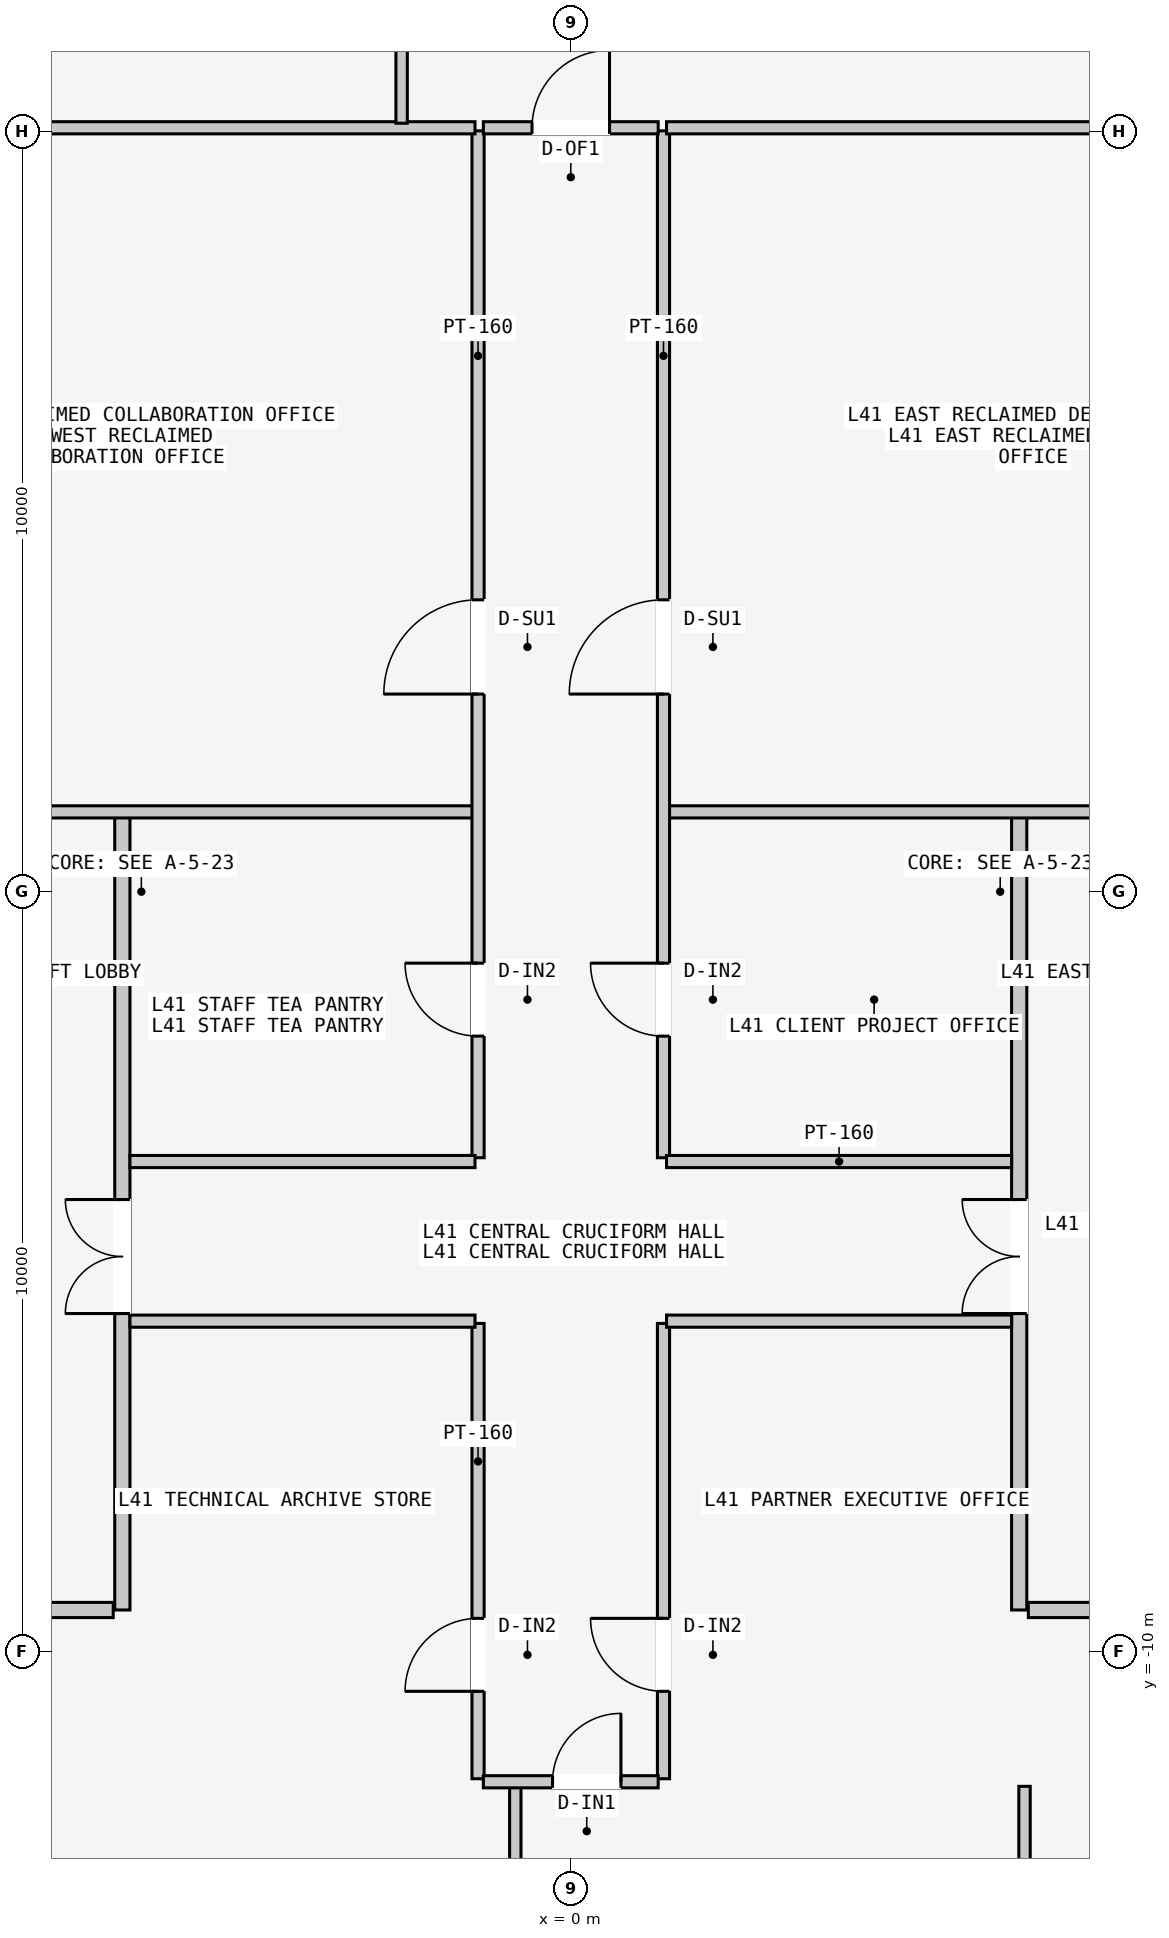
"""IFC4 building model, lengths in metres.
Left out: names, types, materials, properties, quantities, classifications, styles, units other than length and angle.
Written with IfcOpenShell. Run it as: python <this file> out.ifc"""

import sys

from ifc_helpers import new_model, si_unit, direction, frame, frame_2d, origin, place, context, subcontext, project, spatial, rectangle, extrude, element, fill, save


model = new_model("IFC4")
c1 = context("Model", 3, precision=1e-05, world=origin(), true_north=direction((0.0, 1.0)))
c2 = subcontext(c1, "Body", "Model", "MODEL_VIEW")
j1 = project(units=[si_unit("LENGTHUNIT", "METRE"), si_unit("PLANEANGLEUNIT", "RADIAN")], contexts=[c1])
p1 = place(None, origin())
s1 = spatial("IfcSite", under=j1, at=p1, CompositionType="ELEMENT")
p2 = place(p1, origin())
s2 = spatial("IfcBuilding", under=s1, at=p2, CompositionType="ELEMENT")
p3 = place(p2, frame((0.0, 0.0, 158.7)))
s3 = spatial("IfcBuildingStorey", under=s2, at=p3, CompositionType="ELEMENT", Elevation=158.7)
p4 = place(p3, frame((-5.9, -9.45, 0.0), z_axis=(0.0, 0.0, 1.0), x_axis=(0.0, 1.0, 0.0)))
e1 = element("IfcWall", 1, at=p4, inside=s3, PredefinedType="PARTITIONING", context=c2, shape_type="SweptSolid", body=[
    extrude(rectangle(XDim=10.5, YDim=0.2, at=frame_2d((5.25, 0.0))), origin(), (0.0, 0.0, 1.0), 3.4),
])
p5 = place(p4, frame((3.9, 0.0, 0.0)))
e2 = element("IfcOpeningElement", 2, at=p5, cuts=e1, PredefinedType="OPENING", context=c2, shape_type="SweptSolid", body=[
    extrude(rectangle(XDim=1.5, YDim=2.2, at=frame_2d((0.75, 1.1))), frame((0.0, 0.11, 0.0), z_axis=(0.0, -1.0, 0.0), x_axis=(1.0, 0.0, 0.0)), (0.0, 0.0, 1.0), 0.22),
])
p6 = place(p3, frame((-6.02, -9.45, 0.0), z_axis=(0.0, 0.0, 1.0), x_axis=(-1.0, 0.0, 0.0)))
e3 = element("IfcWall", 3, at=p6, inside=s3, PredefinedType="PARTITIONING", context=c2, shape_type="SweptSolid", body=[
    extrude(rectangle(XDim=1.8, YDim=0.2, at=frame_2d((0.9, 0.0))), origin(), (0.0, 0.0, 1.0), 3.4),
])
p7 = place(p3, frame((5.9, -9.45, 0.0), z_axis=(0.0, 0.0, 1.0), x_axis=(0.0, 1.0, 0.0)))
e4 = element("IfcWall", 4, at=p7, inside=s3, PredefinedType="PARTITIONING", context=c2, shape_type="SweptSolid", body=[
    extrude(rectangle(XDim=10.5, YDim=0.2, at=frame_2d((5.25, 0.0))), origin(), (0.0, 0.0, 1.0), 3.4),
])
p8 = place(p7, frame((3.9, 0.0, 0.0)))
e5 = element("IfcOpeningElement", 5, at=p8, cuts=e4, PredefinedType="OPENING", context=c2, shape_type="SweptSolid", body=[
    extrude(rectangle(XDim=1.5, YDim=2.2, at=frame_2d((0.75, 1.1))), frame((0.0, 0.11, 0.0), z_axis=(0.0, -1.0, 0.0), x_axis=(1.0, 0.0, 0.0)), (0.0, 0.0, 1.0), 0.22),
])
p9 = place(p3, frame((6.02, -9.45, 0.0), z_axis=(0.0, 0.0, 1.0), x_axis=(1.0, 0.0, 0.0)))
e6 = element("IfcWall", 6, at=p9, inside=s3, PredefinedType="PARTITIONING", context=c2, shape_type="SweptSolid", body=[
    extrude(rectangle(XDim=1.8, YDim=0.2, at=frame_2d((0.9, 0.0))), origin(), (0.0, 0.0, 1.0), 3.4),
])
p10 = place(p3, frame((-10.05, 1.05, 0.0), z_axis=(0.0, 0.0, 1.0), x_axis=(1.0, 0.0, 0.0)))
e7 = element("IfcWall", 7, at=p10, inside=s3, PredefinedType="PARTITIONING", context=c2, shape_type="SweptSolid", body=[
    extrude(rectangle(XDim=8.79, YDim=0.16, at=frame_2d((4.395, 0.0))), origin(), (0.0, 0.0, 1.0), 3.4),
])
p11 = place(p3, frame((-1.22, -3.5, 0.0), z_axis=(0.0, 0.0, 1.0), x_axis=(0.0, 1.0, 0.0)))
e8 = element("IfcWall", 8, at=p11, inside=s3, PredefinedType="PARTITIONING", context=c2, shape_type="SweptSolid", body=[
    extrude(rectangle(XDim=13.51, YDim=0.16, at=frame_2d((6.755, 0.0))), origin(), (0.0, 0.0, 1.0), 3.4),
])
p12 = place(p11, frame((6.1, 0.0, 0.0)))
e9 = element("IfcOpeningElement", 9, at=p12, cuts=e8, PredefinedType="OPENING", context=c2, shape_type="SweptSolid", body=[
    extrude(rectangle(XDim=1.24, YDim=2.24, at=frame_2d((0.62, 1.12))), frame((0.0, 0.09, 0.0), z_axis=(0.0, -1.0, 0.0), x_axis=(1.0, 0.0, 0.0)), (0.0, 0.0, 1.0), 0.18),
])
p13 = place(p11, frame((1.6, 0.0, 0.0)))
e10 = element("IfcOpeningElement", 10, at=p13, cuts=e8, PredefinedType="OPENING", context=c2, shape_type="SweptSolid", body=[
    extrude(rectangle(XDim=0.96, YDim=2.18, at=frame_2d((0.48, 1.09))), frame((0.0, 0.09, 0.0), z_axis=(0.0, -1.0, 0.0), x_axis=(1.0, 0.0, 0.0)), (0.0, 0.0, 1.0), 0.18),
])
p14 = place(p3, frame((-7.5, 10.05, 0.0), z_axis=(0.0, 0.0, 1.0), x_axis=(1.0, 0.0, 0.0)))
e11 = element("IfcWall", 11, at=p14, inside=s3, PredefinedType="PARTITIONING", context=c2, shape_type="SweptSolid", body=[
    extrude(rectangle(XDim=6.24, YDim=0.16, at=frame_2d((3.12, 0.0))), origin(), (0.0, 0.0, 1.0), 3.4),
])
p15 = place(p3, frame((-5.8, -3.55, 0.0), z_axis=(0.0, 0.0, 1.0), x_axis=(1.0, 0.0, 0.0)))
e12 = element("IfcWall", 12, at=p15, inside=s3, PredefinedType="PARTITIONING", context=c2, shape_type="SweptSolid", body=[
    extrude(rectangle(XDim=4.54, YDim=0.16, at=frame_2d((2.27, 0.0))), origin(), (0.0, 0.0, 1.0), 3.4),
])
p16 = place(p3, frame((1.26, 1.05, 0.0), z_axis=(0.0, 0.0, 1.0), x_axis=(1.0, 0.0, 0.0)))
e13 = element("IfcWall", 13, at=p16, inside=s3, PredefinedType="PARTITIONING", context=c2, shape_type="SweptSolid", body=[
    extrude(rectangle(XDim=8.8, YDim=0.16, at=frame_2d((4.4, 0.0))), origin(), (0.0, 0.0, 1.0), 3.4),
])
p17 = place(p3, frame((1.22, -3.5, 0.0), z_axis=(0.0, 0.0, 1.0), x_axis=(0.0, 1.0, 0.0)))
e14 = element("IfcWall", 14, at=p17, inside=s3, PredefinedType="PARTITIONING", context=c2, shape_type="SweptSolid", body=[
    extrude(rectangle(XDim=13.51, YDim=0.16, at=frame_2d((6.755, 0.0))), origin(), (0.0, 0.0, 1.0), 3.4),
])
p18 = place(p17, frame((6.1, 0.0, 0.0)))
e15 = element("IfcOpeningElement", 15, at=p18, cuts=e14, PredefinedType="OPENING", context=c2, shape_type="SweptSolid", body=[
    extrude(rectangle(XDim=1.24, YDim=2.24, at=frame_2d((0.62, 1.12))), frame((0.0, 0.09, 0.0), z_axis=(0.0, -1.0, 0.0), x_axis=(1.0, 0.0, 0.0)), (0.0, 0.0, 1.0), 0.18),
])
p19 = place(p17, frame((1.6, 0.0, 0.0)))
e16 = element("IfcOpeningElement", 16, at=p19, cuts=e14, PredefinedType="OPENING", context=c2, shape_type="SweptSolid", body=[
    extrude(rectangle(XDim=0.96, YDim=2.18, at=frame_2d((0.48, 1.09))), frame((0.0, 0.09, 0.0), z_axis=(0.0, -1.0, 0.0), x_axis=(1.0, 0.0, 0.0)), (0.0, 0.0, 1.0), 0.18),
])
p20 = place(p3, frame((1.26, 10.05, 0.0), z_axis=(0.0, 0.0, 1.0), x_axis=(1.0, 0.0, 0.0)))
e17 = element("IfcWall", 17, at=p20, inside=s3, PredefinedType="PARTITIONING", context=c2, shape_type="SweptSolid", body=[
    extrude(rectangle(XDim=6.24, YDim=0.16, at=frame_2d((3.12, 0.0))), origin(), (0.0, 0.0, 1.0), 3.4),
])
p21 = place(p3, frame((1.26, -3.55, 0.0), z_axis=(0.0, 0.0, 1.0), x_axis=(1.0, 0.0, 0.0)))
e18 = element("IfcWall", 18, at=p21, inside=s3, PredefinedType="PARTITIONING", context=c2, shape_type="SweptSolid", body=[
    extrude(rectangle(XDim=4.54, YDim=0.16, at=frame_2d((2.27, 0.0))), origin(), (0.0, 0.0, 1.0), 3.4),
])
p22 = place(p3, frame((-1.22, -11.67, 0.0), z_axis=(0.0, 0.0, 1.0), x_axis=(0.0, 1.0, 0.0)))
e19 = element("IfcWall", 19, at=p22, inside=s3, PredefinedType="PARTITIONING", context=c2, shape_type="SweptSolid", body=[
    extrude(rectangle(XDim=5.99, YDim=0.16, at=frame_2d((2.995, 0.0))), origin(), (0.0, 0.0, 1.0), 3.4),
])
p23 = place(p22, frame((1.15, 0.0, 0.0)))
e20 = element("IfcOpeningElement", 20, at=p23, cuts=e19, PredefinedType="OPENING", context=c2, shape_type="SweptSolid", body=[
    extrude(rectangle(XDim=0.96, YDim=2.18, at=frame_2d((0.48, 1.09))), frame((0.0, 0.09, 0.0), z_axis=(0.0, -1.0, 0.0), x_axis=(1.0, 0.0, 0.0)), (0.0, 0.0, 1.0), 0.18),
])
p24 = place(p3, frame((1.22, -11.67, 0.0), z_axis=(0.0, 0.0, 1.0), x_axis=(0.0, 1.0, 0.0)))
e21 = element("IfcWall", 21, at=p24, inside=s3, PredefinedType="PARTITIONING", context=c2, shape_type="SweptSolid", body=[
    extrude(rectangle(XDim=5.99, YDim=0.16, at=frame_2d((2.995, 0.0))), origin(), (0.0, 0.0, 1.0), 3.4),
])
p25 = place(p24, frame((1.15, 0.0, 0.0)))
e22 = element("IfcOpeningElement", 22, at=p25, cuts=e21, PredefinedType="OPENING", context=c2, shape_type="SweptSolid", body=[
    extrude(rectangle(XDim=0.96, YDim=2.18, at=frame_2d((0.48, 1.09))), frame((0.0, 0.09, 0.0), z_axis=(0.0, -1.0, 0.0), x_axis=(1.0, 0.0, 0.0)), (0.0, 0.0, 1.0), 0.18),
])
for number, where, z_axis, x_axis in (
    (23, (-5.8, -5.65, 0.0), (0.0, 0.0, 1.0), (1.0, 0.0, 0.0)),
    (24, (1.26, -5.65, 0.0), (0.0, 0.0, 1.0), (1.0, 0.0, 0.0)),
):
    element("IfcWall", number, at=place(p3, frame(where, z_axis=z_axis, x_axis=x_axis)), inside=s3, PredefinedType="PARTITIONING", context=c2, shape_type="SweptSolid", body=[
        extrude(rectangle(XDim=4.54, YDim=0.16, at=frame_2d((2.27, 0.0))), origin(), (0.0, 0.0, 1.0), 3.4),
    ])
p26 = place(p3, frame((-2.226, 10.11, 0.0), z_axis=(0.0, 0.0, 1.0), x_axis=(0.0, 1.0, 0.0)))
e25 = element("IfcWall", 25, at=p26, inside=s3, PredefinedType="PARTITIONING", context=c2, shape_type="SweptSolid", body=[
    extrude(rectangle(XDim=8.45, YDim=0.15, at=frame_2d((4.225, 0.0))), origin(), (0.0, 0.0, 1.0), 3.4),
])
p27 = place(p26, frame((1.15, 0.0, 0.0)))
e26 = element("IfcOpeningElement", 26, at=p27, cuts=e25, PredefinedType="OPENING", context=c2, shape_type="SweptSolid", body=[
    extrude(rectangle(XDim=0.96, YDim=2.18, at=frame_2d((0.48, 1.09))), frame((0.0, 0.085, 0.0), z_axis=(0.0, -1.0, 0.0), x_axis=(1.0, 0.0, 0.0)), (0.0, 0.0, 1.0), 0.17),
])
p28 = place(p3, frame((-1.15, 10.05, 0.0), z_axis=(0.0, 0.0, 1.0), x_axis=(1.0, 0.0, 0.0)))
e27 = element("IfcWall", 27, at=p28, inside=s3, PredefinedType="PARTITIONING", context=c2, shape_type="SweptSolid", body=[
    extrude(rectangle(XDim=2.3, YDim=0.16, at=frame_2d((1.15, 0.0))), origin(), (0.0, 0.0, 1.0), 3.4),
])
p29 = place(p28, frame((0.64, 0.0, 0.0)))
e28 = element("IfcOpeningElement", 28, at=p29, cuts=e27, PredefinedType="OPENING", context=c2, shape_type="SweptSolid", body=[
    extrude(rectangle(XDim=1.02, YDim=2.2, at=frame_2d((0.51, 1.1))), frame((0.0, 0.09, 0.0), z_axis=(0.0, -1.0, 0.0), x_axis=(1.0, 0.0, 0.0)), (0.0, 0.0, 1.0), 0.18),
])
p30 = place(p3, frame((-0.73, -17.55, 0.0), z_axis=(0.0, 0.0, 1.0), x_axis=(0.0, 1.0, 0.0)))
e29 = element("IfcWall", 29, at=p30, inside=s3, PredefinedType="PARTITIONING", context=c2, shape_type="SweptSolid", body=[
    extrude(rectangle(XDim=5.78, YDim=0.15, at=frame_2d((2.89, 0.0))), origin(), (0.0, 0.0, 1.0), 3.4),
])
p31 = place(p30, frame((1.05, 0.0, 0.0)))
e30 = element("IfcOpeningElement", 30, at=p31, cuts=e29, PredefinedType="OPENING", context=c2, shape_type="SweptSolid", body=[
    extrude(rectangle(XDim=0.96, YDim=2.18, at=frame_2d((0.48, 1.09))), frame((0.0, 0.085, 0.0), z_axis=(0.0, -1.0, 0.0), x_axis=(1.0, 0.0, 0.0)), (0.0, 0.0, 1.0), 0.17),
])
p32 = place(p3, frame((5.97, -18.56, 0.0), z_axis=(0.0, 0.0, 1.0), x_axis=(0.0, 1.0, 0.0)))
e31 = element("IfcWall", 31, at=p32, inside=s3, PredefinedType="PARTITIONING", context=c2, shape_type="SweptSolid", body=[
    extrude(rectangle(XDim=6.79, YDim=0.15, at=frame_2d((3.395, 0.0))), origin(), (0.0, 0.0, 1.0), 3.4),
])
p33 = place(p32, frame((1.05, 0.0, 0.0)))
e32 = element("IfcOpeningElement", 32, at=p33, cuts=e31, PredefinedType="OPENING", context=c2, shape_type="SweptSolid", body=[
    extrude(rectangle(XDim=0.96, YDim=2.18, at=frame_2d((0.48, 1.09))), frame((0.0, 0.085, 0.0), z_axis=(0.0, -1.0, 0.0), x_axis=(1.0, 0.0, 0.0)), (0.0, 0.0, 1.0), 0.17),
])
p34 = place(p3, frame((-1.15, -11.71, 0.0), z_axis=(0.0, 0.0, 1.0), x_axis=(1.0, 0.0, 0.0)))
e33 = element("IfcWall", 33, at=p34, inside=s3, PredefinedType="PARTITIONING", context=c2, shape_type="SweptSolid", body=[
    extrude(rectangle(XDim=2.3, YDim=0.16, at=frame_2d((1.15, 0.0))), origin(), (0.0, 0.0, 1.0), 3.4),
])
p35 = place(p34, frame((0.91, 0.0, 0.0)))
e34 = element("IfcOpeningElement", 34, at=p35, cuts=e33, PredefinedType="OPENING", context=c2, shape_type="SweptSolid", body=[
    extrude(rectangle(XDim=0.9, YDim=2.15, at=frame_2d((0.45, 1.075))), frame((0.0, 0.09, 0.0), z_axis=(0.0, -1.0, 0.0), x_axis=(1.0, 0.0, 0.0)), (0.0, 0.0, 1.0), 0.18),
])
p36 = place(p5, origin())
e35 = element("IfcDoor", 35, at=p36, inside=s3, OperationType="DOUBLE_DOOR_SINGLE_SWING", PredefinedType="DOOR", context=c2, shape_type="SweptSolid", body=[
    extrude(rectangle(XDim=1.5, YDim=2.2, at=frame_2d((0.75, 1.1))), frame((0.0, 0.025, 0.0), z_axis=(0.0, -1.0, 0.0), x_axis=(1.0, 0.0, 0.0)), (0.0, 0.0, 1.0), 0.05),
])
fill(e2, e35)
p37 = place(p8, origin())
e36 = element("IfcDoor", 36, at=p37, inside=s3, OperationType="DOUBLE_DOOR_SINGLE_SWING", PredefinedType="DOOR", context=c2, shape_type="SweptSolid", body=[
    extrude(rectangle(XDim=1.5, YDim=2.2, at=frame_2d((0.75, 1.1))), frame((0.0, 0.025, 0.0), z_axis=(0.0, -1.0, 0.0), x_axis=(1.0, 0.0, 0.0)), (0.0, 0.0, 1.0), 0.05),
])
fill(e5, e36)
p38 = place(p12, origin())
e37 = element("IfcDoor", 37, at=p38, inside=s3, OperationType="SINGLE_SWING_LEFT", PredefinedType="DOOR", context=c2, shape_type="SweptSolid", body=[
    extrude(rectangle(XDim=1.24, YDim=2.24, at=frame_2d((0.62, 1.12))), frame((0.0, 0.025, 0.0), z_axis=(0.0, -1.0, 0.0), x_axis=(1.0, 0.0, 0.0)), (0.0, 0.0, 1.0), 0.05),
])
fill(e9, e37)
p39 = place(p13, origin())
e38 = element("IfcDoor", 38, at=p39, inside=s3, OperationType="SINGLE_SWING_RIGHT", PredefinedType="DOOR", context=c2, shape_type="SweptSolid", body=[
    extrude(rectangle(XDim=0.96, YDim=2.18, at=frame_2d((0.48, 1.09))), frame((0.0, 0.025, 0.0), z_axis=(0.0, -1.0, 0.0), x_axis=(1.0, 0.0, 0.0)), (0.0, 0.0, 1.0), 0.05),
])
fill(e10, e38)
p40 = place(p18, origin())
e39 = element("IfcDoor", 39, at=p40, inside=s3, OperationType="SINGLE_SWING_LEFT", PredefinedType="DOOR", context=c2, shape_type="SweptSolid", body=[
    extrude(rectangle(XDim=1.24, YDim=2.24, at=frame_2d((0.62, 1.12))), frame((0.0, 0.025, 0.0), z_axis=(0.0, -1.0, 0.0), x_axis=(1.0, 0.0, 0.0)), (0.0, 0.0, 1.0), 0.05),
])
fill(e15, e39)
p41 = place(p19, origin())
e40 = element("IfcDoor", 40, at=p41, inside=s3, OperationType="SINGLE_SWING_RIGHT", PredefinedType="DOOR", context=c2, shape_type="SweptSolid", body=[
    extrude(rectangle(XDim=0.96, YDim=2.18, at=frame_2d((0.48, 1.09))), frame((0.0, 0.025, 0.0), z_axis=(0.0, -1.0, 0.0), x_axis=(1.0, 0.0, 0.0)), (0.0, 0.0, 1.0), 0.05),
])
fill(e16, e40)
p42 = place(p23, origin())
e41 = element("IfcDoor", 41, at=p42, inside=s3, OperationType="SINGLE_SWING_LEFT", PredefinedType="DOOR", context=c2, shape_type="SweptSolid", body=[
    extrude(rectangle(XDim=0.96, YDim=2.18, at=frame_2d((0.48, 1.09))), frame((0.0, 0.025, 0.0), z_axis=(0.0, -1.0, 0.0), x_axis=(1.0, 0.0, 0.0)), (0.0, 0.0, 1.0), 0.05),
])
fill(e20, e41)
p43 = place(p25, origin())
e42 = element("IfcDoor", 42, at=p43, inside=s3, OperationType="SINGLE_SWING_RIGHT", PredefinedType="DOOR", context=c2, shape_type="SweptSolid", body=[
    extrude(rectangle(XDim=0.96, YDim=2.18, at=frame_2d((0.48, 1.09))), frame((0.0, 0.025, 0.0), z_axis=(0.0, -1.0, 0.0), x_axis=(1.0, 0.0, 0.0)), (0.0, 0.0, 1.0), 0.05),
])
fill(e22, e42)
p44 = place(p29, origin())
e43 = element("IfcDoor", 43, at=p44, inside=s3, OperationType="SINGLE_SWING_RIGHT", PredefinedType="DOOR", context=c2, shape_type="SweptSolid", body=[
    extrude(rectangle(XDim=1.02, YDim=2.2, at=frame_2d((0.51, 1.1))), frame((0.0, 0.025, 0.0), z_axis=(0.0, -1.0, 0.0), x_axis=(1.0, 0.0, 0.0)), (0.0, 0.0, 1.0), 0.05),
])
fill(e28, e43)
p45 = place(p35, origin())
e44 = element("IfcDoor", 44, at=p45, inside=s3, OperationType="SINGLE_SWING_RIGHT", PredefinedType="DOOR", context=c2, shape_type="SweptSolid", body=[
    extrude(rectangle(XDim=0.9, YDim=2.15, at=frame_2d((0.45, 1.075))), frame((0.0, 0.025, 0.0), z_axis=(0.0, -1.0, 0.0), x_axis=(1.0, 0.0, 0.0)), (0.0, 0.0, 1.0), 0.05),
])
fill(e34, e44)
save(model, sys.argv[1])
